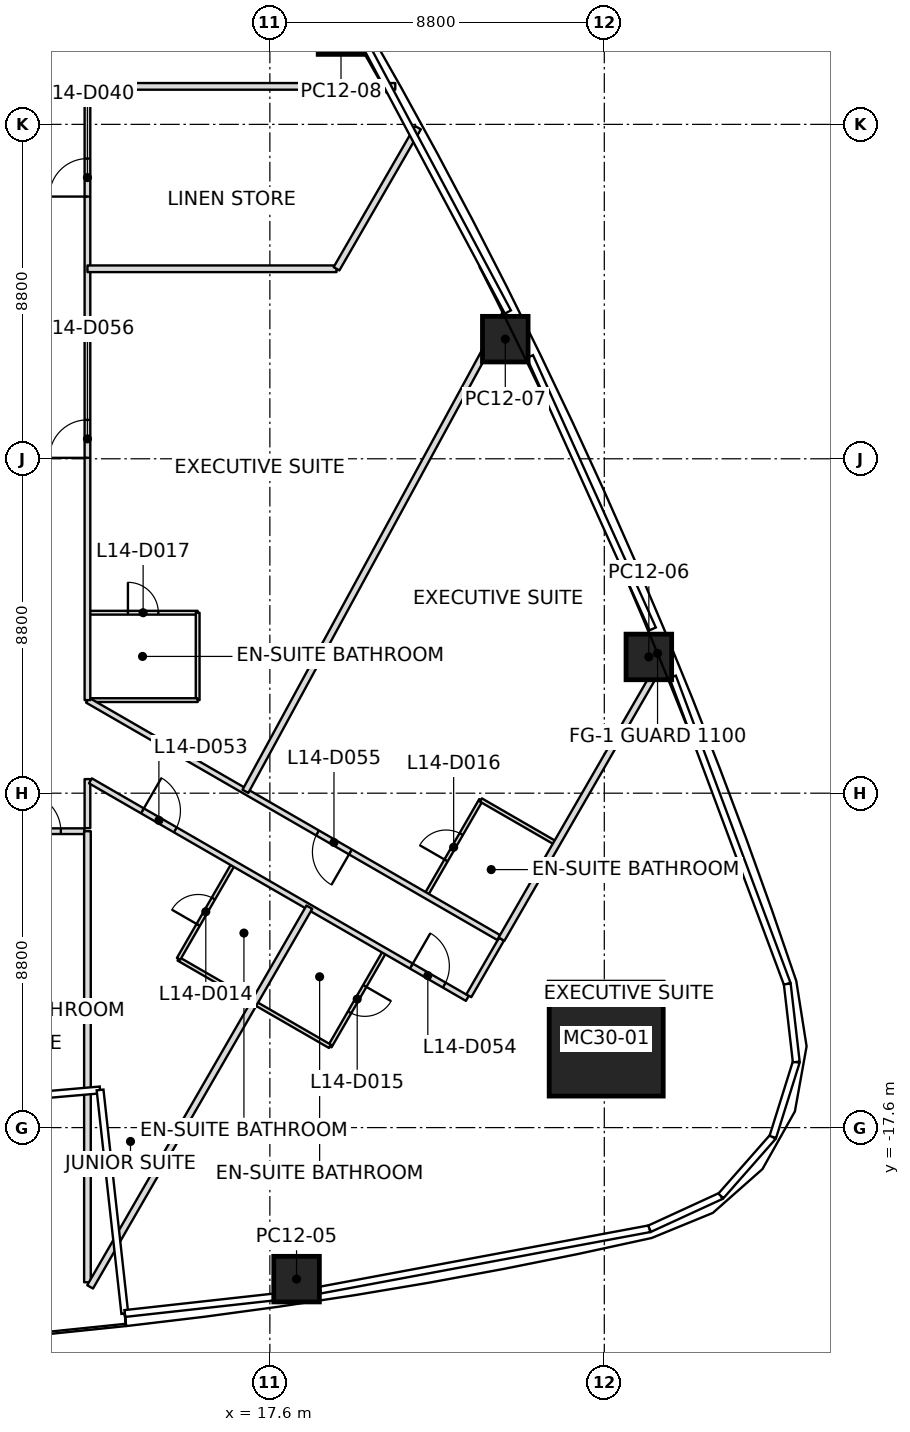
"""IFC4 building model, lengths in metres.
Left out: names, types, materials, properties, quantities, classifications, styles, units other than length and angle.
Written with IfcOpenShell. Run it as: python <this file> out.ifc"""

import sys

from ifc_helpers import new_model, si_unit, direction, frame, frame_2d, origin, origin_2d, place, context, subcontext, project, spatial, rectangle, extrude, clip, halfspace, element, fill, save


model = new_model("IFC4")
c1 = context("Model", 3, precision=1e-05, world=origin(), true_north=direction((0.0, 1.0)))
c2 = subcontext(c1, "Body", "Model", "MODEL_VIEW")
j1 = project(units=[si_unit("LENGTHUNIT", "METRE"), si_unit("PLANEANGLEUNIT", "RADIAN")], contexts=[c1])
p1 = place(None, origin())
s1 = spatial("IfcSite", under=j1, at=p1, CompositionType="ELEMENT")
p2 = place(p1, origin())
s2 = spatial("IfcBuilding", under=s1, at=p2, CompositionType="ELEMENT")
p3 = place(p2, frame((0.0, 0.0, 73.9)))
s3 = spatial("IfcBuildingStorey", under=s2, at=p3, CompositionType="ELEMENT", Elevation=73.9)
p4 = place(p3, frame((26.45, -15.271, 0.0), z_axis=(-0.030529980019, 0.017605841609, 0.999378784376), x_axis=(0.999533851513, 0.000537756667, 0.030525243614)))
e1 = element("IfcColumn", 1, at=p4, inside=s3, PredefinedType="COLUMN", context=c2, shape_type="SweptSolid", body=[
    extrude(rectangle(XDim=3.0, YDim=3.0, at=origin_2d()), origin(), (0.0, 0.0, 1.0), 3.702),
])
p5 = place(p3, frame((18.302, -21.588, 0.0), z_axis=(-0.019208006386, 0.075319066138, 0.996974468463), x_axis=(0.989033666926, 0.147478079221, 0.007913396017)))
e2 = element("IfcColumn", 2, at=p5, inside=s3, PredefinedType="COLUMN", context=c2, shape_type="SweptSolid", body=[
    clip(clip(extrude(rectangle(XDim=1.2, YDim=1.2, at=origin_2d()), origin(), (0.0, 0.0, 1.0), 3.711), halfspace(frame((0.0, 0.0, 0.015)), True)), halfspace(frame((0.0, 0.0, 3.697)), False)),
])
p6 = place(p3, frame((27.572, -5.215, 0.0), z_axis=(-0.01945938583, 0.010950027281, 0.999750683523), x_axis=(-0.381230527726, 0.924313522422, -0.01754414426)))
e3 = element("IfcColumn", 3, at=p6, inside=s3, PredefinedType="COLUMN", context=c2, shape_type="SweptSolid", body=[
    extrude(rectangle(XDim=1.2, YDim=1.2, at=origin_2d()), origin(), (0.0, 0.0, 1.0), 3.701),
])
p7 = place(p3, frame((23.795, 3.148, 0.0), z_axis=(-0.015371594408, 0.002243065278, 0.999879334092), x_axis=(-0.441566424908, 0.897185395141, -0.008801087387)))
e4 = element("IfcColumn", 4, at=p7, inside=s3, PredefinedType="COLUMN", context=c2, shape_type="SweptSolid", body=[
    extrude(rectangle(XDim=1.2, YDim=1.2, at=origin_2d()), origin(), (0.0, 0.0, 1.0), 3.701),
])
p8 = place(p3, frame((19.472, 11.242, 0.0), z_axis=(-0.010688020009, -0.006201690622, 0.999923649716), x_axis=(-0.499971440741, 0.866041891424, 2.7221193e-05)))
e5 = element("IfcColumn", 5, at=p8, inside=s3, PredefinedType="COLUMN", context=c2, shape_type="SweptSolid", body=[
    extrude(rectangle(XDim=1.2, YDim=1.2, at=origin_2d()), origin(), (0.0, 0.0, 1.0), 3.7),
])
p9 = place(p3, frame((12.8, -9.8, 0.0), z_axis=(0.0, 0.0, 1.0), x_axis=(0.0, -1.0, 0.0)))
e6 = element("IfcWall", 6, at=p9, inside=s3, PredefinedType="PARTITIONING", context=c2, shape_type="SweptSolid", body=[
    extrude(rectangle(XDim=11.87, YDim=0.175, at=frame_2d((5.935, 0.0))), origin(), (0.0, 0.0, 1.0), 3.15),
])
p10 = place(p3, frame((12.8, 5.0, 0.0), z_axis=(0.0, 0.0, 1.0), x_axis=(1.0, 0.0, 0.0)))
e7 = element("IfcWall", 7, at=p10, inside=s3, PredefinedType="PARTITIONING", context=c2, shape_type="SweptSolid", body=[
    extrude(rectangle(XDim=6.553, YDim=0.175, at=frame_2d((3.277, 0.0))), origin(), (0.0, 0.0, 1.0), 3.017),
])
p11 = place(p3, frame((19.354, 5.0, 0.0), z_axis=(0.0, 0.0, 1.0), x_axis=(0.499978750566, 0.866037671803, 0.0)))
e8 = element("IfcWall", 8, at=p11, inside=s3, PredefinedType="PARTITIONING", context=c2, shape_type="SweptSolid", body=[
    extrude(rectangle(XDim=4.288, YDim=0.175, at=frame_2d((2.144, 0.0))), origin(), (0.0, 0.0, 1.0), 2.934),
])
p12 = place(p3, frame((18.638, -11.8, 0.0), z_axis=(0.0, 0.0, 1.0), x_axis=(-0.499983180204, -0.866035114481, 0.0)))
e9 = element("IfcWall", 9, at=p12, inside=s3, PredefinedType="PARTITIONING", context=c2, shape_type="SweptSolid", body=[
    extrude(rectangle(XDim=11.537, YDim=0.175, at=frame_2d((5.769, 0.0))), origin(), (0.0, 0.0, 1.0), 2.797),
])
p13 = place(p3, frame((20.9, 9.8, 0.0), z_axis=(0.0, 0.0, 1.0), x_axis=(-1.0, 0.0, 0.0)))
e10 = element("IfcWall", 10, at=p13, inside=s3, PredefinedType="PARTITIONING", context=c2, shape_type="SweptSolid", body=[
    extrude(rectangle(XDim=8.02, YDim=0.175, at=frame_2d((4.01, 0.0))), origin(), (0.0, 0.0, 1.0), 2.934),
])
p14 = place(p3, frame((16.957, -8.751, 0.0), z_axis=(0.0, 0.0, 1.0), x_axis=(0.478298198166, 0.878197491246, 0.0)))
e11 = element("IfcWall", 11, at=p14, inside=s3, PredefinedType="PARTITIONING", context=c2, shape_type="SweptSolid", body=[
    extrude(rectangle(XDim=14.3, YDim=0.175, at=frame_2d((7.15, 0.0))), origin(), (0.0, 0.0, 1.0), 2.947),
])
p15 = place(p3, frame((23.695, -12.641, 0.0), z_axis=(0.0, 0.0, 1.0), x_axis=(0.500011096892, 0.866018996896, 0.0)))
e12 = element("IfcWall", 12, at=p15, inside=s3, PredefinedType="PARTITIONING", context=c2, shape_type="SweptSolid", body=[
    extrude(rectangle(XDim=8.761, YDim=0.175, at=frame_2d((4.381, 0.0))), origin(), (0.0, 0.0, 1.0), 2.934),
])
p16 = place(p3, frame((-12.72, -9.8, 0.0), z_axis=(0.0, 0.0, 1.0), x_axis=(1.0, 0.0, 0.0)))
e13 = element("IfcWall", 13, at=p16, inside=s3, PredefinedType="PARTITIONING", context=c2, shape_type="SweptSolid", body=[
    extrude(rectangle(XDim=25.44, YDim=0.15, at=frame_2d((12.72, 0.0))), origin(), (0.0, 0.0, 1.0), 2.947),
])
p17 = place(p16, frame((3.22, 0.0, 0.0)))
e14 = element("IfcOpeningElement", 14, at=p17, cuts=e13, PredefinedType="OPENING", context=c2, shape_type="SweptSolid", body=[
    extrude(rectangle(XDim=1.0, YDim=2.1, at=frame_2d((0.5, 1.05))), frame((0.0, 0.075, 0.0), z_axis=(0.0, -1.0, 0.0), x_axis=(1.0, 0.0, 0.0)), (0.0, 0.0, 1.0), 0.15),
])
p18 = place(p16, frame((8.22, 0.0, 0.0)))
e15 = element("IfcOpeningElement", 15, at=p18, cuts=e13, PredefinedType="OPENING", context=c2, shape_type="SweptSolid", body=[
    extrude(rectangle(XDim=1.0, YDim=2.1, at=frame_2d((0.5, 1.05))), frame((0.0, 0.075, 0.0), z_axis=(0.0, -1.0, 0.0), x_axis=(1.0, 0.0, 0.0)), (0.0, 0.0, 1.0), 0.15),
])
p19 = place(p16, frame((13.32, 0.0, 0.0)))
e16 = element("IfcOpeningElement", 16, at=p19, cuts=e13, PredefinedType="OPENING", context=c2, shape_type="SweptSolid", body=[
    extrude(rectangle(XDim=1.0, YDim=2.1, at=frame_2d((0.5, 1.05))), frame((0.0, 0.075, 0.0), z_axis=(0.0, -1.0, 0.0), x_axis=(1.0, 0.0, 0.0)), (0.0, 0.0, 1.0), 0.15),
])
p20 = place(p16, frame((18.72, 0.0, 0.0)))
e17 = element("IfcOpeningElement", 17, at=p20, cuts=e13, PredefinedType="OPENING", context=c2, shape_type="SweptSolid", body=[
    extrude(rectangle(XDim=1.0, YDim=2.1, at=frame_2d((0.5, 1.05))), frame((0.0, 0.075, 0.0), z_axis=(0.0, -1.0, 0.0), x_axis=(1.0, 0.0, 0.0)), (0.0, 0.0, 1.0), 0.15),
])
p21 = place(p16, frame((23.82, 0.0, 0.0)))
e18 = element("IfcOpeningElement", 18, at=p21, cuts=e13, PredefinedType="OPENING", context=c2, shape_type="SweptSolid", body=[
    extrude(rectangle(XDim=1.0, YDim=2.1, at=frame_2d((0.5, 1.05))), frame((0.0, 0.075, 0.0), z_axis=(0.0, -1.0, 0.0), x_axis=(1.0, 0.0, 0.0)), (0.0, 0.0, 1.0), 0.15),
])
p22 = place(p3, frame((12.72, 9.8, 0.0), z_axis=(0.0, 0.0, 1.0), x_axis=(-1.0, 0.0, 0.0)))
e19 = element("IfcWall", 19, at=p22, inside=s3, PredefinedType="PARTITIONING", context=c2, shape_type="SweptSolid", body=[
    extrude(rectangle(XDim=1.62, YDim=0.15, at=frame_2d((0.81, 0.0))), origin(), (0.0, 0.0, 1.0), 3.15),
])
p23 = place(p3, frame((12.8, -9.72, 0.0), z_axis=(0.0, 0.0, 1.0), x_axis=(0.0, 1.0, 0.0)))
e20 = element("IfcWall", 20, at=p23, inside=s3, PredefinedType="PARTITIONING", context=c2, shape_type="SweptSolid", body=[
    extrude(rectangle(XDim=1.291, YDim=0.15, at=frame_2d((0.646, 0.0))), origin(), (0.0, 0.0, 1.0), 2.797),
])
p24 = place(p3, frame((12.879, -8.475, 0.0), z_axis=(0.0, 0.0, 1.0), x_axis=(0.866022251081, -0.500005460603, 0.0)))
e21 = element("IfcWall", 21, at=p24, inside=s3, PredefinedType="PARTITIONING", context=c2, shape_type="SweptSolid", body=[
    extrude(rectangle(XDim=11.45, YDim=0.15, at=frame_2d((5.725, 0.0))), origin(), (0.0, 0.0, 1.0), 2.797),
])
p25 = place(p24, frame((1.579, 0.0, 0.0)))
e22 = element("IfcOpeningElement", 22, at=p25, cuts=e21, PredefinedType="OPENING", context=c2, shape_type="SweptSolid", body=[
    extrude(rectangle(XDim=1.0, YDim=2.1, at=frame_2d((0.5, 1.05))), frame((0.0, 0.075, 0.0), z_axis=(0.0, -1.0, 0.0), x_axis=(1.0, 0.0, 0.0)), (0.0, 0.0, 1.0), 0.15),
])
p26 = place(p24, frame((9.75, 0.0, 0.0)))
e23 = element("IfcOpeningElement", 23, at=p26, cuts=e21, PredefinedType="OPENING", context=c2, shape_type="SweptSolid", body=[
    extrude(rectangle(XDim=1.0, YDim=2.1, at=frame_2d((0.5, 1.05))), frame((0.0, 0.075, 0.0), z_axis=(0.0, -1.0, 0.0), x_axis=(1.0, 0.0, 0.0)), (0.0, 0.0, 1.0), 0.15),
])
p27 = place(p3, frame((22.835, -14.131, 0.0), z_axis=(0.0, 0.0, 1.0), x_axis=(0.499955923987, 0.866050849587, 0.0)))
e24 = element("IfcWall", 24, at=p27, inside=s3, PredefinedType="PARTITIONING", context=c2, shape_type="SweptSolid", body=[
    extrude(rectangle(XDim=1.72, YDim=0.15, at=frame_2d((0.86, 0.0))), origin(), (0.0, 0.0, 1.0), 2.797),
])
p28 = place(p3, frame((23.626, -12.601, 0.0), z_axis=(0.0, 0.0, 1.0), x_axis=(-0.866025575766, 0.499999702119, 0.0)))
e25 = element("IfcWall", 25, at=p28, inside=s3, PredefinedType="PARTITIONING", context=c2, shape_type="SweptSolid", body=[
    extrude(rectangle(XDim=12.501, YDim=0.15, at=frame_2d((6.25, 0.0))), origin(), (0.0, 0.0, 1.0), 2.947),
])
p29 = place(p28, frame((4.51, 0.0, 0.0)))
e26 = element("IfcOpeningElement", 26, at=p29, cuts=e25, PredefinedType="OPENING", context=c2, shape_type="SweptSolid", body=[
    extrude(rectangle(XDim=1.0, YDim=2.1, at=frame_2d((0.5, 1.05))), frame((0.0, 0.075, 0.0), z_axis=(0.0, -1.0, 0.0), x_axis=(1.0, 0.0, 0.0)), (0.0, 0.0, 1.0), 0.15),
])
p30 = place(p3, frame((12.8, -6.351, 0.0), z_axis=(0.0, 0.0, 1.0), x_axis=(0.0, 1.0, 0.0)))
e27 = element("IfcWall", 27, at=p30, inside=s3, PredefinedType="PARTITIONING", context=c2, shape_type="SweptSolid", body=[
    extrude(rectangle(XDim=16.071, YDim=0.15, at=frame_2d((8.035, 0.0))), origin(), (0.0, 0.0, 1.0), 2.947),
])
p31 = place(p30, frame((13.251, 0.0, 0.0)))
e28 = element("IfcOpeningElement", 28, at=p31, cuts=e27, PredefinedType="OPENING", context=c2, shape_type="SweptSolid", body=[
    extrude(rectangle(XDim=1.0, YDim=2.1, at=frame_2d((0.5, 1.05))), frame((0.0, 0.075, 0.0), z_axis=(0.0, -1.0, 0.0), x_axis=(1.0, 0.0, 0.0)), (0.0, 0.0, 1.0), 0.15),
])
p32 = place(p30, frame((6.375, 0.0, 0.0)))
e29 = element("IfcOpeningElement", 29, at=p32, cuts=e27, PredefinedType="OPENING", context=c2, shape_type="SweptSolid", body=[
    extrude(rectangle(XDim=1.0, YDim=2.1, at=frame_2d((0.5, 1.05))), frame((0.0, 0.075, 0.0), z_axis=(0.0, -1.0, 0.0), x_axis=(1.0, 0.0, 0.0)), (0.0, 0.0, 1.0), 0.15),
])
p33 = place(p3, frame((12.83, -4.051, 0.0), z_axis=(0.0, 0.0, 1.0), x_axis=(1.0, 0.0, 0.0)))
e30 = element("IfcWall", 30, at=p33, inside=s3, PredefinedType="PARTITIONING", context=c2, shape_type="SweptSolid", body=[
    extrude(rectangle(XDim=2.87, YDim=0.1, at=frame_2d((1.435, 0.0))), origin(), (0.0, 0.0, 1.0), 3.15),
])
p34 = place(p33, frame((1.035, 0.0, 0.0)))
e31 = element("IfcOpeningElement", 31, at=p34, cuts=e30, PredefinedType="OPENING", context=c2, shape_type="SweptSolid", body=[
    extrude(rectangle(XDim=0.8, YDim=2.1, at=frame_2d((0.4, 1.05))), frame((0.0, 0.05, 0.0), z_axis=(0.0, -1.0, 0.0), x_axis=(1.0, 0.0, 0.0)), (0.0, 0.0, 1.0), 0.1),
])
p35 = place(p3, frame((15.7, -4.051, 0.0), z_axis=(0.0, 0.0, 1.0), x_axis=(0.0, -1.0, 0.0)))
e32 = element("IfcWall", 32, at=p35, inside=s3, PredefinedType="PARTITIONING", context=c2, shape_type="SweptSolid", body=[
    extrude(rectangle(XDim=2.3, YDim=0.1, at=frame_2d((1.15, 0.0))), origin(), (0.0, 0.0, 1.0), 2.947),
])
p36 = place(p3, frame((15.7, -6.351, 0.0), z_axis=(0.0, 0.0, 1.0), x_axis=(-1.0, 0.0, 0.0)))
e33 = element("IfcWall", 33, at=p36, inside=s3, PredefinedType="PARTITIONING", context=c2, shape_type="SweptSolid", body=[
    extrude(rectangle(XDim=2.84, YDim=0.1, at=frame_2d((1.42, 0.0))), origin(), (0.0, 0.0, 1.0), 3.15),
])
p37 = place(p3, frame((17.163, -14.297, 0.0), z_axis=(0.0, 0.0, 1.0), x_axis=(-0.866044110172, 0.499967598186, 0.0)))
e34 = element("IfcWall", 34, at=p37, inside=s3, PredefinedType="PARTITIONING", context=c2, shape_type="SweptSolid", body=[
    extrude(rectangle(XDim=2.27, YDim=0.1, at=frame_2d((1.135, 0.0))), origin(), (0.0, 0.0, 1.0), 3.15),
])
p38 = place(p3, frame((15.197, -13.162, 0.0), z_axis=(0.0, 0.0, 1.0), x_axis=(0.499999802827, 0.866025517622, 0.0)))
e35 = element("IfcWall", 35, at=p38, inside=s3, PredefinedType="PARTITIONING", context=c2, shape_type="SweptSolid", body=[
    extrude(rectangle(XDim=2.87, YDim=0.1, at=frame_2d((1.435, 0.0))), origin(), (0.0, 0.0, 1.0), 2.797),
])
p39 = place(p38, frame((1.035, 0.0, 0.0)))
e36 = element("IfcOpeningElement", 36, at=p39, cuts=e35, PredefinedType="OPENING", context=c2, shape_type="SweptSolid", body=[
    extrude(rectangle(XDim=0.8, YDim=2.1, at=frame_2d((0.4, 1.05))), frame((0.0, 0.05, 0.0), z_axis=(0.0, -1.0, 0.0), x_axis=(1.0, 0.0, 0.0)), (0.0, 0.0, 1.0), 0.1),
])
p40 = place(p3, frame((20.615, -12.976, 0.0), z_axis=(0.0, 0.0, 1.0), x_axis=(-0.499936001555, -0.866062350151, 0.0)))
e37 = element("IfcWall", 37, at=p40, inside=s3, PredefinedType="PARTITIONING", context=c2, shape_type="SweptSolid", body=[
    extrude(rectangle(XDim=2.87, YDim=0.1, at=frame_2d((1.435, 0.0))), origin(), (0.0, 0.0, 1.0), 3.15),
])
p41 = place(p40, frame((1.035, 0.0, 0.0)))
e38 = element("IfcOpeningElement", 38, at=p41, cuts=e37, PredefinedType="OPENING", context=c2, shape_type="SweptSolid", body=[
    extrude(rectangle(XDim=0.8, YDim=2.1, at=frame_2d((0.4, 1.05))), frame((0.0, 0.05, 0.0), z_axis=(0.0, -1.0, 0.0), x_axis=(1.0, 0.0, 0.0)), (0.0, 0.0, 1.0), 0.1),
])
p42 = place(p3, frame((19.18, -15.462, 0.0), z_axis=(0.0, 0.0, 1.0), x_axis=(-0.866044110172, 0.499967598186, 0.0)))
e39 = element("IfcWall", 39, at=p42, inside=s3, PredefinedType="PARTITIONING", context=c2, shape_type="SweptSolid", body=[
    extrude(rectangle(XDim=2.27, YDim=0.1, at=frame_2d((1.135, 0.0))), origin(), (0.0, 0.0, 1.0), 3.15),
])
p43 = place(p3, frame((21.719, -11.465, 0.0), z_axis=(0.0, 0.0, 1.0), x_axis=(0.499999802827, 0.866025517622, 0.0)))
e40 = element("IfcWall", 40, at=p43, inside=s3, PredefinedType="PARTITIONING", context=c2, shape_type="SweptSolid", body=[
    extrude(rectangle(XDim=2.87, YDim=0.1, at=frame_2d((1.435, 0.0))), origin(), (0.0, 0.0, 1.0), 3.15),
])
p44 = place(p43, frame((1.035, 0.0, 0.0)))
e41 = element("IfcOpeningElement", 41, at=p44, cuts=e40, PredefinedType="OPENING", context=c2, shape_type="SweptSolid", body=[
    extrude(rectangle(XDim=0.8, YDim=2.1, at=frame_2d((0.4, 1.05))), frame((0.0, 0.05, 0.0), z_axis=(0.0, -1.0, 0.0), x_axis=(1.0, 0.0, 0.0)), (0.0, 0.0, 1.0), 0.1),
])
p45 = place(p3, frame((23.154, -8.98, 0.0), z_axis=(0.0, 0.0, 1.0), x_axis=(0.866017224141, -0.500014167291, 0.0)))
e42 = element("IfcWall", 42, at=p45, inside=s3, PredefinedType="PARTITIONING", context=c2, shape_type="SweptSolid", body=[
    extrude(rectangle(XDim=2.27, YDim=0.1, at=frame_2d((1.135, 0.0))), origin(), (0.0, 0.0, 1.0), 3.15),
])
p46 = place(p31, origin())
e43 = element("IfcDoor", 43, at=p46, inside=s3, OperationType="SINGLE_SWING_LEFT", PredefinedType="DOOR", context=c2, shape_type="SweptSolid", body=[
    extrude(rectangle(XDim=1.0, YDim=2.1, at=frame_2d((0.5, 1.05))), frame((0.0, 0.025, 0.0), z_axis=(0.0, -1.0, 0.0), x_axis=(1.0, 0.0, 0.0)), (0.0, 0.0, 1.0), 0.05),
])
fill(e28, e43)
p47 = place(p21, origin())
e44 = element("IfcDoor", 44, at=p47, inside=s3, OperationType="SINGLE_SWING_LEFT", PredefinedType="DOOR", context=c2, shape_type="SweptSolid", body=[
    extrude(rectangle(XDim=1.0, YDim=2.1, at=frame_2d((0.5, 1.05))), frame((0.0, 0.025, 0.0), z_axis=(0.0, -1.0, 0.0), x_axis=(1.0, 0.0, 0.0)), (0.0, 0.0, 1.0), 0.05),
])
fill(e18, e44)
p48 = place(p25, origin())
e45 = element("IfcDoor", 45, at=p48, inside=s3, OperationType="SINGLE_SWING_RIGHT", PredefinedType="DOOR", context=c2, shape_type="SweptSolid", body=[
    extrude(rectangle(XDim=1.0, YDim=2.1, at=frame_2d((0.5, 1.05))), frame((0.0, 0.025, 0.0), z_axis=(0.0, -1.0, 0.0), x_axis=(1.0, 0.0, 0.0)), (0.0, 0.0, 1.0), 0.05),
])
fill(e22, e45)
p49 = place(p39, origin())
e46 = element("IfcDoor", 46, at=p49, inside=s3, OperationType="SINGLE_SWING_RIGHT", PredefinedType="DOOR", context=c2, shape_type="SweptSolid", body=[
    extrude(rectangle(XDim=0.8, YDim=2.1, at=frame_2d((0.4, 1.05))), frame((0.0, 0.025, 0.0), z_axis=(0.0, -1.0, 0.0), x_axis=(1.0, 0.0, 0.0)), (0.0, 0.0, 1.0), 0.05),
])
fill(e36, e46)
p50 = place(p26, origin())
e47 = element("IfcDoor", 47, at=p50, inside=s3, OperationType="SINGLE_SWING_LEFT", PredefinedType="DOOR", context=c2, shape_type="SweptSolid", body=[
    extrude(rectangle(XDim=1.0, YDim=2.1, at=frame_2d((0.5, 1.05))), frame((0.0, 0.025, 0.0), z_axis=(0.0, -1.0, 0.0), x_axis=(1.0, 0.0, 0.0)), (0.0, 0.0, 1.0), 0.05),
])
fill(e23, e47)
p51 = place(p41, origin())
e48 = element("IfcDoor", 48, at=p51, inside=s3, OperationType="SINGLE_SWING_RIGHT", PredefinedType="DOOR", context=c2, shape_type="SweptSolid", body=[
    extrude(rectangle(XDim=0.8, YDim=2.1, at=frame_2d((0.4, 1.05))), frame((0.0, 0.025, 0.0), z_axis=(0.0, -1.0, 0.0), x_axis=(1.0, 0.0, 0.0)), (0.0, 0.0, 1.0), 0.05),
])
fill(e38, e48)
p52 = place(p29, origin())
e49 = element("IfcDoor", 49, at=p52, inside=s3, OperationType="SINGLE_SWING_LEFT", PredefinedType="DOOR", context=c2, shape_type="SweptSolid", body=[
    extrude(rectangle(XDim=1.0, YDim=2.1, at=frame_2d((0.5, 1.05))), frame((0.0, 0.025, 0.0), z_axis=(0.0, -1.0, 0.0), x_axis=(1.0, 0.0, 0.0)), (0.0, 0.0, 1.0), 0.05),
])
fill(e26, e49)
p53 = place(p44, origin())
e50 = element("IfcDoor", 50, at=p53, inside=s3, OperationType="SINGLE_SWING_LEFT", PredefinedType="DOOR", context=c2, shape_type="SweptSolid", body=[
    extrude(rectangle(XDim=0.8, YDim=2.1, at=frame_2d((0.4, 1.05))), frame((0.0, 0.025, 0.0), z_axis=(0.0, -1.0, 0.0), x_axis=(1.0, 0.0, 0.0)), (0.0, 0.0, 1.0), 0.05),
])
fill(e41, e50)
p54 = place(p32, origin())
e51 = element("IfcDoor", 51, at=p54, inside=s3, OperationType="SINGLE_SWING_LEFT", PredefinedType="DOOR", context=c2, shape_type="SweptSolid", body=[
    extrude(rectangle(XDim=1.0, YDim=2.1, at=frame_2d((0.5, 1.05))), frame((0.0, 0.025, 0.0), z_axis=(0.0, -1.0, 0.0), x_axis=(1.0, 0.0, 0.0)), (0.0, 0.0, 1.0), 0.05),
])
fill(e29, e51)
p55 = place(p34, origin())
e52 = element("IfcDoor", 52, at=p55, inside=s3, OperationType="SINGLE_SWING_LEFT", PredefinedType="DOOR", context=c2, shape_type="SweptSolid", body=[
    extrude(rectangle(XDim=0.8, YDim=2.1, at=frame_2d((0.4, 1.05))), frame((0.0, 0.025, 0.0), z_axis=(0.0, -1.0, 0.0), x_axis=(1.0, 0.0, 0.0)), (0.0, 0.0, 1.0), 0.05),
])
fill(e31, e52)
save(model, sys.argv[1])
